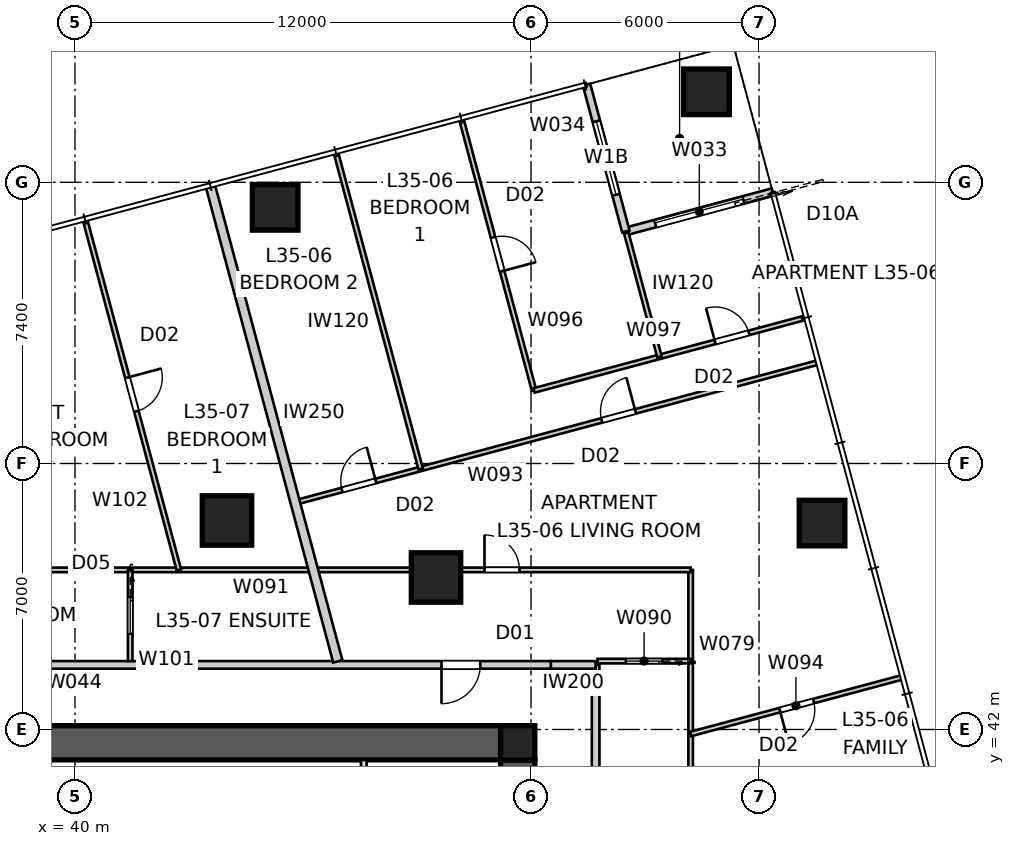
"""IFC4 building model, lengths in metres.
Left out: names, types, materials, properties, quantities, classifications, styles, units other than length and angle.
Written with IfcOpenShell. Run it as: python <this file> out.ifc"""

import sys

from ifc_helpers import new_model, si_unit, direction, frame, frame_2d, origin, origin_2d, place, context, subcontext, project, spatial, polyline, rectangle, outline, extrude, element, fill, save


model = new_model("IFC4")
c1 = context("Model", 3, precision=1e-05, world=origin(), true_north=direction((0.0, 1.0)))
c2 = subcontext(c1, "Body", "Model", "MODEL_VIEW")
j1 = project(units=[si_unit("LENGTHUNIT", "METRE"), si_unit("PLANEANGLEUNIT", "RADIAN")], contexts=[c1])
p1 = place(None, origin())
s1 = spatial("IfcSite", under=j1, at=p1, CompositionType="ELEMENT")
p2 = place(p1, origin())
s2 = spatial("IfcBuilding", under=s1, at=p2, CompositionType="ELEMENT")
p3 = place(p2, frame((0.0, 0.0, 128.6)))
s3 = spatial("IfcBuildingStorey", under=s2, at=p3, CompositionType="ELEMENT", Elevation=128.6)
p4 = place(p3, frame((28.8, 41.65, 0.0), z_axis=(0.0, 0.0, 1.0), x_axis=(1.0, 0.0, 0.0)))
e1 = element("IfcWall", 1, at=p4, inside=s3, PredefinedType="SHEAR", context=c2, shape_type="SweptSolid", body=[
    extrude(outline(polyline([(0.0, -0.45), (22.4, -0.45), (22.4, -0.025), (22.85, -0.025), (22.85, 0.025), (22.4, 0.025), (22.4, 0.45), (0.0, 0.45), (0.0, 0.025), (-0.45, 0.025), (-0.45, -0.025), (0.0, -0.025), (0.0, -0.45)])), origin(), (0.0, 0.0, 1.0), 3.4),
])
p5 = place(p3, frame((51.65, 18.8, 0.0), z_axis=(0.0, 0.0, 1.0), x_axis=(0.0, 1.0, 0.0)))
e2 = element("IfcWall", 2, at=p5, inside=s3, PredefinedType="SHEAR", context=c2, shape_type="SweptSolid", body=[
    extrude(outline(polyline([(0.0, -0.45), (22.4, -0.45), (22.4, -0.025), (22.85, -0.025), (22.85, 0.025), (22.4, 0.025), (22.4, 0.45), (0.0, 0.45), (0.0, 0.025), (-0.45, 0.025), (-0.45, -0.025), (0.0, -0.025), (0.0, -0.45)])), origin(), (0.0, 0.0, 1.0), 3.4),
])
p6 = place(p5, frame((11.14, 0.0, 0.0)))
e3 = element("IfcOpeningElement", 3, at=p6, cuts=e2, PredefinedType="OPENING", context=c2, shape_type="SweptSolid", body=[
    extrude(rectangle(XDim=1.02, YDim=2.4, at=frame_2d((0.51, 1.2))), frame((0.0, 0.46, 0.0), z_axis=(0.0, -1.0, 0.0), x_axis=(1.0, 0.0, 0.0)), (0.0, 0.0, 1.0), 0.92),
])
p7 = place(p3, frame((51.65, 41.65, 0.0), z_axis=(0.0, 0.0, 1.0), x_axis=(1.0, 0.0, 0.0)))
e4 = element("IfcColumn", 4, at=p7, inside=s3, PredefinedType="COLUMN", context=c2, shape_type="SweptSolid", body=[
    extrude(rectangle(XDim=0.9, YDim=0.9, at=origin_2d()), origin(), (0.0, 0.0, 1.0), 3.4),
])
for number, where, z_axis, x_axis in (
    (5, (59.658, 47.432, 0.0), (0.0, 0.0, 1.0), (1.0, 0.0, 0.0)),
    (6, (56.617, 58.781, 0.0), (0.0, 0.0, 1.0), (1.0, 0.0, 0.0)),
    (7, (45.267, 55.74, 0.0), (0.0, 0.0, 1.0), (1.0, 0.0, 0.0)),
):
    element("IfcColumn", number, at=place(p3, frame(where, z_axis=z_axis, x_axis=x_axis)), inside=s3, PredefinedType="COLUMN", context=c2, shape_type="SweptSolid", body=[
        extrude(rectangle(XDim=1.2, YDim=1.2, at=origin_2d()), origin(), (0.0, 0.0, 1.0), 3.4),
    ])
for number, where, z_axis, x_axis in (
    (8, (49.5, 46.0, 0.0), (0.0, 0.0, 1.0), (1.0, 0.0, 0.0)),
    (9, (44.0, 47.5, 0.0), (0.0, 0.0, 1.0), (1.0, 0.0, 0.0)),
):
    element("IfcColumn", number, at=place(p3, frame(where, z_axis=z_axis, x_axis=x_axis)), inside=s3, PredefinedType="COLUMN", context=c2, shape_type="SweptSolid", body=[
        extrude(rectangle(XDim=1.3, YDim=1.3, at=origin_2d()), origin(), (0.0, 0.0, 1.0), 3.4),
    ])
p8 = place(p3, frame((58.359, 56.143, 0.0), z_axis=(0.0, 0.0, 1.0), x_axis=(-0.965919172068, -0.258843877716, 0.0)))
e10 = element("IfcWall", 10, at=p8, inside=s3, PredefinedType="SOLIDWALL", context=c2, shape_type="SweptSolid", body=[
    extrude(rectangle(XDim=4.0, YDim=0.2, at=frame_2d((2.0, 0.0))), origin(), (0.0, 0.0, 1.0), 3.25),
])
p9 = place(p8, frame((0.8, 0.0, 0.0)))
e11 = element("IfcOpeningElement", 11, at=p9, cuts=e10, PredefinedType="OPENING", context=c2, shape_type="SweptSolid", body=[
    extrude(rectangle(XDim=2.4, YDim=2.1, at=frame_2d((1.2, 1.05))), frame((0.0, 0.11, 0.0), z_axis=(0.0, -1.0, 0.0), x_axis=(1.0, 0.0, 0.0)), (0.0, 0.0, 1.0), 0.22),
])
p10 = place(p3, frame((54.496, 55.107, 0.0), z_axis=(0.0, 0.0, 1.0), x_axis=(-0.258786931944, 0.965934430412, 0.0)))
e12 = element("IfcWall", 12, at=p10, inside=s3, PredefinedType="SOLIDWALL", context=c2, shape_type="SweptSolid", body=[
    extrude(rectangle(XDim=4.0, YDim=0.2, at=frame_2d((2.0, 0.0))), origin(), (0.0, 0.0, 1.0), 3.25),
])
p11 = place(p10, frame((1.0, 0.0, 0.45)))
e13 = element("IfcOpeningElement", 13, at=p11, cuts=e12, PredefinedType="OPENING", context=c2, shape_type="SweptSolid", body=[
    extrude(rectangle(XDim=2.0, YDim=1.8, at=frame_2d((1.0, 0.9))), frame((0.0, 0.11, 0.0), z_axis=(0.0, -1.0, 0.0), x_axis=(1.0, 0.0, 0.0)), (0.0, 0.0, 1.0), 0.22),
])
p12 = place(p3, frame((53.7, 17.48, 0.0), z_axis=(0.0, 0.0, 1.0), x_axis=(0.0, 1.0, 0.0)))
e14 = element("IfcWall", 14, at=p12, inside=s3, PredefinedType="PARTITIONING", context=c2, shape_type="SweptSolid", body=[
    extrude(rectangle(XDim=26.22, YDim=0.2, at=frame_2d((13.11, 0.0))), origin(), (0.0, 0.0, 1.0), 3.25),
])
p13 = place(p12, frame((2.252, 0.0, 0.0)))
e15 = element("IfcOpeningElement", 15, at=p13, cuts=e14, PredefinedType="OPENING", context=c2, shape_type="SweptSolid", body=[
    extrude(rectangle(XDim=1.02, YDim=2.34, at=frame_2d((0.51, 1.17))), frame((0.0, 0.11, 0.0), z_axis=(0.0, -1.0, 0.0), x_axis=(1.0, 0.0, 0.0)), (0.0, 0.0, 1.0), 0.22),
])
p14 = place(p12, frame((7.328, 0.0, 0.0)))
e16 = element("IfcOpeningElement", 16, at=p14, cuts=e14, PredefinedType="OPENING", context=c2, shape_type="SweptSolid", body=[
    extrude(rectangle(XDim=1.02, YDim=2.34, at=frame_2d((0.51, 1.17))), frame((0.0, 0.11, 0.0), z_axis=(0.0, -1.0, 0.0), x_axis=(1.0, 0.0, 0.0)), (0.0, 0.0, 1.0), 0.22),
])
p15 = place(p3, frame((53.7, 43.7, 0.0), z_axis=(0.0, 0.0, 1.0), x_axis=(-1.0, 0.0, 0.0)))
e17 = element("IfcWall", 17, at=p15, inside=s3, PredefinedType="PARTITIONING", context=c2, shape_type="SweptSolid", body=[
    extrude(rectangle(XDim=1.18, YDim=0.2, at=frame_2d((0.59, 0.0))), origin(), (0.0, 0.0, 1.0), 2.722),
])
p16 = place(p3, frame((52.52, 43.7, 0.0), z_axis=(0.0, 0.0, 1.0), x_axis=(-1.0, 0.0, 0.0)))
e18 = element("IfcWall", 18, at=p16, inside=s3, PredefinedType="PARTITIONING", context=c2, shape_type="SweptSolid", body=[
    extrude(rectangle(XDim=27.02, YDim=0.2, at=frame_2d((13.51, 0.0))), origin(), (0.0, 0.0, 1.0), 3.25),
])
p17 = place(p16, frame((22.208, 0.0, 0.0)))
e19 = element("IfcOpeningElement", 19, at=p17, cuts=e18, PredefinedType="OPENING", context=c2, shape_type="SweptSolid", body=[
    extrude(rectangle(XDim=1.02, YDim=2.34, at=frame_2d((0.51, 1.17))), frame((0.0, 0.11, 0.0), z_axis=(0.0, -1.0, 0.0), x_axis=(1.0, 0.0, 0.0)), (0.0, 0.0, 1.0), 0.22),
])
p18 = place(p16, frame((1.856, 0.0, 0.0)))
e20 = element("IfcOpeningElement", 20, at=p18, cuts=e18, PredefinedType="OPENING", context=c2, shape_type="SweptSolid", body=[
    extrude(rectangle(XDim=1.02, YDim=2.34, at=frame_2d((0.51, 1.17))), frame((0.0, 0.11, 0.0), z_axis=(0.0, -1.0, 0.0), x_axis=(1.0, 0.0, 0.0)), (0.0, 0.0, 1.0), 0.22),
])
p19 = place(p3, frame((43.56, 56.318, 0.0), z_axis=(0.0, 0.0, 1.0), x_axis=(0.258822671559, -0.965924854576, 0.0)))
e21 = element("IfcWall", 21, at=p19, inside=s3, PredefinedType="PARTITIONING", context=c2, shape_type="SweptSolid", body=[
    extrude(rectangle(XDim=12.966, YDim=0.25, at=frame_2d((6.483, 0.0))), origin(), (0.0, 0.0, 1.0), 3.25),
])
p20 = place(p3, frame((47.6, 41.2, 0.0), z_axis=(0.0, 0.0, 1.0), x_axis=(0.0, -1.0, 0.0)))
e22 = element("IfcWall", 22, at=p20, inside=s3, PredefinedType="SOLIDWALL", context=c2, shape_type="SweptSolid", body=[
    extrude(rectangle(XDim=5.9, YDim=0.15, at=frame_2d((2.95, 0.0))), origin(), (0.0, 0.0, 1.0), 3.25),
])
p21 = place(p3, frame((56.2, 46.2, 0.0), z_axis=(0.0, 0.0, 1.0), x_axis=(0.0, -1.0, 0.0)))
e23 = element("IfcWall", 23, at=p21, inside=s3, PredefinedType="PARTITIONING", context=c2, shape_type="SweptSolid", body=[
    extrude(rectangle(XDim=33.2, YDim=0.12, at=frame_2d((16.6, 0.0))), origin(), (0.0, 0.0, 1.0), 2.55),
])
p22 = place(p21, frame((23.955, 0.0, 0.0)))
e24 = element("IfcOpeningElement", 24, at=p22, cuts=e23, PredefinedType="OPENING", context=c2, shape_type="SweptSolid", body=[
    extrude(rectangle(XDim=0.92, YDim=2.34, at=frame_2d((0.46, 1.17))), frame((0.0, 0.07, 0.0), z_axis=(0.0, -1.0, 0.0), x_axis=(1.0, 0.0, 0.0)), (0.0, 0.0, 1.0), 0.14),
])
p23 = place(p21, frame((20.966, 0.0, 0.0)))
e25 = element("IfcOpeningElement", 25, at=p23, cuts=e23, PredefinedType="OPENING", context=c2, shape_type="SweptSolid", body=[
    extrude(rectangle(XDim=0.92, YDim=2.34, at=frame_2d((0.46, 1.17))), frame((0.0, 0.07, 0.0), z_axis=(0.0, -1.0, 0.0), x_axis=(1.0, 0.0, 0.0)), (0.0, 0.0, 1.0), 0.14),
])
p24 = place(p21, frame((13.174, 0.0, 0.0)))
e26 = element("IfcOpeningElement", 26, at=p24, cuts=e23, PredefinedType="OPENING", context=c2, shape_type="SweptSolid", body=[
    extrude(rectangle(XDim=0.96, YDim=2.1, at=frame_2d((0.48, 1.05))), frame((0.0, 0.07, 0.0), z_axis=(0.0, -1.0, 0.0), x_axis=(1.0, 0.0, 0.0)), (0.0, 0.0, 1.0), 0.14),
])
p25 = place(p3, frame((56.2, 43.8, 0.0), z_axis=(0.0, 0.0, 1.0), x_axis=(-1.0, 0.0, 0.0)))
e27 = element("IfcWall", 27, at=p25, inside=s3, PredefinedType="PARTITIONING", context=c2, shape_type="SweptSolid", body=[
    extrude(rectangle(XDim=2.45, YDim=0.12, at=frame_2d((1.225, 0.0))), origin(), (0.0, 0.0, 1.0), 2.722),
])
p26 = place(p25, frame((0.745, 0.0, 0.0)))
e28 = element("IfcOpeningElement", 28, at=p26, cuts=e27, PredefinedType="OPENING", context=c2, shape_type="SweptSolid", body=[
    extrude(rectangle(XDim=0.96, YDim=2.1, at=frame_2d((0.48, 1.05))), frame((0.0, 0.07, 0.0), z_axis=(0.0, -1.0, 0.0), x_axis=(1.0, 0.0, 0.0)), (0.0, 0.0, 1.0), 0.14),
])
p27 = place(p3, frame((23.0, 46.2, 0.0), z_axis=(0.0, 0.0, 1.0), x_axis=(1.0, 0.0, 0.0)))
e29 = element("IfcWall", 29, at=p27, inside=s3, PredefinedType="PARTITIONING", context=c2, shape_type="SweptSolid", body=[
    extrude(rectangle(XDim=33.2, YDim=0.12, at=frame_2d((16.6, 0.0))), origin(), (0.0, 0.0, 1.0), 2.55),
])
p28 = place(p27, frame((5.844, 0.0, 0.0)))
e30 = element("IfcOpeningElement", 30, at=p28, cuts=e29, PredefinedType="OPENING", context=c2, shape_type="SweptSolid", body=[
    extrude(rectangle(XDim=0.92, YDim=2.34, at=frame_2d((0.46, 1.17))), frame((0.0, 0.07, 0.0), z_axis=(0.0, -1.0, 0.0), x_axis=(1.0, 0.0, 0.0)), (0.0, 0.0, 1.0), 0.14),
])
p29 = place(p27, frame((3.382, 0.0, 0.0)))
e31 = element("IfcOpeningElement", 31, at=p29, cuts=e29, PredefinedType="OPENING", context=c2, shape_type="SweptSolid", body=[
    extrude(rectangle(XDim=0.92, YDim=2.34, at=frame_2d((0.46, 1.17))), frame((0.0, 0.07, 0.0), z_axis=(0.0, -1.0, 0.0), x_axis=(1.0, 0.0, 0.0)), (0.0, 0.0, 1.0), 0.14),
])
p30 = place(p27, frame((9.452, 0.0, 0.0)))
e32 = element("IfcOpeningElement", 32, at=p30, cuts=e29, PredefinedType="OPENING", context=c2, shape_type="SweptSolid", body=[
    extrude(rectangle(XDim=0.92, YDim=2.34, at=frame_2d((0.46, 1.17))), frame((0.0, 0.07, 0.0), z_axis=(0.0, -1.0, 0.0), x_axis=(1.0, 0.0, 0.0)), (0.0, 0.0, 1.0), 0.14),
])
p31 = place(p27, frame((27.775, 0.0, 0.0)))
e33 = element("IfcOpeningElement", 33, at=p31, cuts=e29, PredefinedType="OPENING", context=c2, shape_type="SweptSolid", body=[
    extrude(rectangle(XDim=0.92, YDim=2.34, at=frame_2d((0.46, 1.17))), frame((0.0, 0.07, 0.0), z_axis=(0.0, -1.0, 0.0), x_axis=(1.0, 0.0, 0.0)), (0.0, 0.0, 1.0), 0.14),
])
p32 = place(p27, frame((15.05, 0.0, 0.0)))
e34 = element("IfcOpeningElement", 34, at=p32, cuts=e29, PredefinedType="OPENING", context=c2, shape_type="SweptSolid", body=[
    extrude(rectangle(XDim=0.96, YDim=2.1, at=frame_2d((0.48, 1.05))), frame((0.0, 0.07, 0.0), z_axis=(0.0, -1.0, 0.0), x_axis=(1.0, 0.0, 0.0)), (0.0, 0.0, 1.0), 0.14),
])
p33 = place(p3, frame((45.796, 47.973, 0.0), z_axis=(0.0, 0.0, 1.0), x_axis=(0.965921975889, 0.258833414564, 0.0)))
e35 = element("IfcWall", 35, at=p33, inside=s3, PredefinedType="PARTITIONING", context=c2, shape_type="SweptSolid", body=[
    extrude(rectangle(XDim=14.21, YDim=0.12, at=frame_2d((7.105, 0.0))), origin(), (0.0, 0.0, 1.0), 3.25),
])
p34 = place(p33, frame((8.348, 0.0, 0.0)))
e36 = element("IfcOpeningElement", 36, at=p34, cuts=e35, PredefinedType="OPENING", context=c2, shape_type="SweptSolid", body=[
    extrude(rectangle(XDim=0.92, YDim=2.34, at=frame_2d((0.46, 1.17))), frame((0.0, 0.07, 0.0), z_axis=(0.0, -1.0, 0.0), x_axis=(1.0, 0.0, 0.0)), (0.0, 0.0, 1.0), 0.14),
])
p35 = place(p33, frame((1.273, 0.0, 0.0)))
e37 = element("IfcOpeningElement", 37, at=p35, cuts=e35, PredefinedType="OPENING", context=c2, shape_type="SweptSolid", body=[
    extrude(rectangle(XDim=0.92, YDim=2.34, at=frame_2d((0.46, 1.17))), frame((0.0, 0.07, 0.0), z_axis=(0.0, -1.0, 0.0), x_axis=(1.0, 0.0, 0.0)), (0.0, 0.0, 1.0), 0.14),
])
p36 = place(p3, frame((61.741, 43.366, 0.0), z_axis=(0.0, 0.0, 1.0), x_axis=(-0.965924876974, -0.25882258797, 0.0)))
e38 = element("IfcWall", 38, at=p36, inside=s3, PredefinedType="PARTITIONING", context=c2, shape_type="SweptSolid", body=[
    extrude(rectangle(XDim=5.737, YDim=0.12, at=frame_2d((2.869, 0.0))), origin(), (0.0, 0.0, 1.0), 3.25),
])
p37 = place(p36, frame((2.388, 0.0, 0.0)))
e39 = element("IfcOpeningElement", 39, at=p37, cuts=e38, PredefinedType="OPENING", context=c2, shape_type="SweptSolid", body=[
    extrude(rectangle(XDim=0.92, YDim=2.34, at=frame_2d((0.46, 1.17))), frame((0.0, 0.07, 0.0), z_axis=(0.0, -1.0, 0.0), x_axis=(1.0, 0.0, 0.0)), (0.0, 0.0, 1.0), 0.14),
])
p38 = place(p3, frame((49.096, 48.857, 0.0), z_axis=(0.0, 0.0, 1.0), x_axis=(-0.258800415469, 0.965930817892, 0.0)))
e40 = element("IfcWall", 40, at=p38, inside=s3, PredefinedType="PARTITIONING", context=c2, shape_type="SweptSolid", body=[
    extrude(rectangle(XDim=8.6, YDim=0.12, at=frame_2d((4.3, 0.0))), origin(), (0.0, 0.0, 1.0), 2.722),
])
p39 = place(p3, frame((50.17, 58.048, 0.0), z_axis=(0.0, 0.0, 1.0), x_axis=(0.258807770359, -0.965928847277, 0.0)))
e41 = element("IfcWall", 41, at=p39, inside=s3, PredefinedType="PARTITIONING", context=c2, shape_type="SweptSolid", body=[
    extrude(rectangle(XDim=7.377, YDim=0.12, at=frame_2d((3.688, 0.0))), origin(), (0.0, 0.0, 1.0), 3.25),
])
p40 = place(p39, frame((3.208, 0.0, 0.0)))
e42 = element("IfcOpeningElement", 42, at=p40, cuts=e41, PredefinedType="OPENING", context=c2, shape_type="SweptSolid", body=[
    extrude(rectangle(XDim=0.92, YDim=2.34, at=frame_2d((0.46, 1.17))), frame((0.0, 0.07, 0.0), z_axis=(0.0, -1.0, 0.0), x_axis=(1.0, 0.0, 0.0)), (0.0, 0.0, 1.0), 0.14),
])
p41 = place(p3, frame((52.08, 50.923, 0.0), z_axis=(0.0, 0.0, 1.0), x_axis=(0.965920573283, 0.258838648792, 0.0)))
e43 = element("IfcWall", 43, at=p41, inside=s3, PredefinedType="PARTITIONING", context=c2, shape_type="SweptSolid", body=[
    extrude(rectangle(XDim=7.377, YDim=0.12, at=frame_2d((3.688, 0.0))), origin(), (0.0, 0.0, 1.0), 3.25),
])
p42 = place(p41, frame((4.932, 0.0, 0.0)))
e44 = element("IfcOpeningElement", 44, at=p42, cuts=e43, PredefinedType="OPENING", context=c2, shape_type="SweptSolid", body=[
    extrude(rectangle(XDim=0.92, YDim=2.34, at=frame_2d((0.46, 1.17))), frame((0.0, 0.07, 0.0), z_axis=(0.0, -1.0, 0.0), x_axis=(1.0, 0.0, 0.0)), (0.0, 0.0, 1.0), 0.14),
])
p43 = place(p3, frame((54.506, 55.069, 0.0), z_axis=(0.0, 0.0, 1.0), x_axis=(0.258783069815, -0.96593546512, 0.0)))
e45 = element("IfcWall", 45, at=p43, inside=s3, PredefinedType="PARTITIONING", context=c2, shape_type="SweptSolid", body=[
    extrude(rectangle(XDim=3.376, YDim=0.12, at=frame_2d((1.688, 0.0))), origin(), (0.0, 0.0, 1.0), 3.25),
])
p44 = place(p3, frame((41.453, 46.2, 0.0), z_axis=(0.0, 0.0, 1.0), x_axis=(0.0, -1.0, 0.0)))
e46 = element("IfcWall", 46, at=p44, inside=s3, PredefinedType="PARTITIONING", context=c2, shape_type="SweptSolid", body=[
    extrude(rectangle(XDim=2.4, YDim=0.12, at=frame_2d((1.2, 0.0))), origin(), (0.0, 0.0, 1.0), 3.25),
])
p45 = place(p44, frame((0.72, 0.0, 0.0)))
e47 = element("IfcOpeningElement", 47, at=p45, cuts=e46, PredefinedType="OPENING", context=c2, shape_type="SweptSolid", body=[
    extrude(rectangle(XDim=0.96, YDim=2.1, at=frame_2d((0.48, 1.05))), frame((0.0, 0.07, 0.0), z_axis=(0.0, -1.0, 0.0), x_axis=(1.0, 0.0, 0.0)), (0.0, 0.0, 1.0), 0.14),
])
p46 = place(p3, frame((40.27, 55.395, 0.0), z_axis=(0.0, 0.0, 1.0), x_axis=(0.25881812666, -0.965926072385, 0.0)))
e48 = element("IfcWall", 48, at=p46, inside=s3, PredefinedType="PARTITIONING", context=c2, shape_type="SweptSolid", body=[
    extrude(rectangle(XDim=9.52, YDim=0.12, at=frame_2d((4.76, 0.0))), origin(), (0.0, 0.0, 1.0), 3.25),
])
p47 = place(p46, frame((4.28, 0.0, 0.0)))
e49 = element("IfcOpeningElement", 49, at=p47, cuts=e48, PredefinedType="OPENING", context=c2, shape_type="SweptSolid", body=[
    extrude(rectangle(XDim=0.92, YDim=2.34, at=frame_2d((0.46, 1.17))), frame((0.0, 0.07, 0.0), z_axis=(0.0, -1.0, 0.0), x_axis=(1.0, 0.0, 0.0)), (0.0, 0.0, 1.0), 0.14),
])
p48 = place(p9, origin())
e50 = element("IfcDoor", 50, at=p48, inside=s3, OperationType="SLIDING_TO_LEFT", PredefinedType="DOOR", context=c2, shape_type="SweptSolid", body=[
    extrude(rectangle(XDim=2.4, YDim=2.1, at=frame_2d((1.2, 1.05))), frame((0.0, 0.025, 0.0), z_axis=(0.0, -1.0, 0.0), x_axis=(1.0, 0.0, 0.0)), (0.0, 0.0, 1.0), 0.05),
])
fill(e11, e50)
p49 = place(p11, origin())
e51 = element("IfcWindow", 51, at=p49, inside=s3, PartitioningType="SINGLE_PANEL", PredefinedType="WINDOW", context=c2, shape_type="SweptSolid", body=[
    extrude(rectangle(XDim=2.0, YDim=1.8, at=frame_2d((1.0, 0.9))), frame((0.0, 0.03, 0.0), z_axis=(0.0, -1.0, 0.0), x_axis=(1.0, 0.0, 0.0)), (0.0, 0.0, 1.0), 0.06),
])
fill(e13, e51)
p50 = place(p18, origin())
e52 = element("IfcDoor", 52, at=p50, inside=s3, OperationType="SINGLE_SWING_RIGHT", PredefinedType="DOOR", context=c2, shape_type="SweptSolid", body=[
    extrude(rectangle(XDim=1.02, YDim=2.34, at=frame_2d((0.51, 1.17))), frame((0.0, 0.025, 0.0), z_axis=(0.0, -1.0, 0.0), x_axis=(1.0, 0.0, 0.0)), (0.0, 0.0, 1.0), 0.05),
])
fill(e20, e52)
p51 = place(p31, origin())
e53 = element("IfcDoor", 53, at=p51, inside=s3, OperationType="SINGLE_SWING_LEFT", PredefinedType="DOOR", context=c2, shape_type="SweptSolid", body=[
    extrude(rectangle(XDim=0.92, YDim=2.34, at=frame_2d((0.46, 1.17))), frame((0.0, 0.025, 0.0), z_axis=(0.0, -1.0, 0.0), x_axis=(1.0, 0.0, 0.0)), (0.0, 0.0, 1.0), 0.05),
])
fill(e33, e53)
p52 = place(p26, origin())
e54 = element("IfcDoor", 54, at=p52, inside=s3, OperationType="SLIDING_TO_LEFT", PredefinedType="DOOR", context=c2, shape_type="SweptSolid", body=[
    extrude(rectangle(XDim=0.96, YDim=2.1, at=frame_2d((0.48, 1.05))), frame((0.0, 0.025, 0.0), z_axis=(0.0, -1.0, 0.0), x_axis=(1.0, 0.0, 0.0)), (0.0, 0.0, 1.0), 0.05),
])
fill(e28, e54)
p53 = place(p45, origin())
e55 = element("IfcDoor", 55, at=p53, inside=s3, OperationType="SLIDING_TO_LEFT", PredefinedType="DOOR", context=c2, shape_type="SweptSolid", body=[
    extrude(rectangle(XDim=0.96, YDim=2.1, at=frame_2d((0.48, 1.05))), frame((0.0, 0.025, 0.0), z_axis=(0.0, -1.0, 0.0), x_axis=(1.0, 0.0, 0.0)), (0.0, 0.0, 1.0), 0.05),
])
fill(e47, e55)
p54 = place(p34, origin())
e56 = element("IfcDoor", 56, at=p54, inside=s3, OperationType="SINGLE_SWING_RIGHT", PredefinedType="DOOR", context=c2, shape_type="SweptSolid", body=[
    extrude(rectangle(XDim=0.92, YDim=2.34, at=frame_2d((0.46, 1.17))), frame((0.0, 0.025, 0.0), z_axis=(0.0, -1.0, 0.0), x_axis=(1.0, 0.0, 0.0)), (0.0, 0.0, 1.0), 0.05),
])
fill(e36, e56)
p55 = place(p37, origin())
e57 = element("IfcDoor", 57, at=p55, inside=s3, OperationType="SINGLE_SWING_RIGHT", PredefinedType="DOOR", context=c2, shape_type="SweptSolid", body=[
    extrude(rectangle(XDim=0.92, YDim=2.34, at=frame_2d((0.46, 1.17))), frame((0.0, 0.025, 0.0), z_axis=(0.0, -1.0, 0.0), x_axis=(1.0, 0.0, 0.0)), (0.0, 0.0, 1.0), 0.05),
])
fill(e39, e57)
p56 = place(p35, origin())
e58 = element("IfcDoor", 58, at=p56, inside=s3, OperationType="SINGLE_SWING_RIGHT", PredefinedType="DOOR", context=c2, shape_type="SweptSolid", body=[
    extrude(rectangle(XDim=0.92, YDim=2.34, at=frame_2d((0.46, 1.17))), frame((0.0, 0.025, 0.0), z_axis=(0.0, -1.0, 0.0), x_axis=(1.0, 0.0, 0.0)), (0.0, 0.0, 1.0), 0.05),
])
fill(e37, e58)
p57 = place(p47, origin())
e59 = element("IfcDoor", 59, at=p57, inside=s3, OperationType="SINGLE_SWING_LEFT", PredefinedType="DOOR", context=c2, shape_type="SweptSolid", body=[
    extrude(rectangle(XDim=0.92, YDim=2.34, at=frame_2d((0.46, 1.17))), frame((0.0, 0.025, 0.0), z_axis=(0.0, -1.0, 0.0), x_axis=(1.0, 0.0, 0.0)), (0.0, 0.0, 1.0), 0.05),
])
fill(e49, e59)
p58 = place(p40, origin())
e60 = element("IfcDoor", 60, at=p58, inside=s3, OperationType="SINGLE_SWING_RIGHT", PredefinedType="DOOR", context=c2, shape_type="SweptSolid", body=[
    extrude(rectangle(XDim=0.92, YDim=2.34, at=frame_2d((0.46, 1.17))), frame((0.0, 0.025, 0.0), z_axis=(0.0, -1.0, 0.0), x_axis=(1.0, 0.0, 0.0)), (0.0, 0.0, 1.0), 0.05),
])
fill(e42, e60)
p59 = place(p42, origin())
e61 = element("IfcDoor", 61, at=p59, inside=s3, OperationType="SINGLE_SWING_LEFT", PredefinedType="DOOR", context=c2, shape_type="SweptSolid", body=[
    extrude(rectangle(XDim=0.92, YDim=2.34, at=frame_2d((0.46, 1.17))), frame((0.0, 0.025, 0.0), z_axis=(0.0, -1.0, 0.0), x_axis=(1.0, 0.0, 0.0)), (0.0, 0.0, 1.0), 0.05),
])
fill(e44, e61)
save(model, sys.argv[1])
